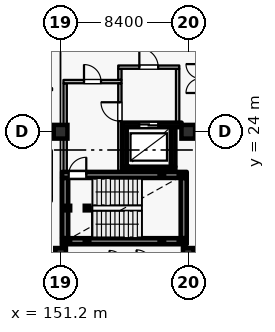
"""IFC4 building model, lengths in metres.
Left out: names, types, materials, properties, quantities, classifications, styles, units other than length and angle.
Written with IfcOpenShell. Run it as: python <this file> out.ifc"""

import sys

from ifc_helpers import new_model, si_unit, direction, frame, frame_2d, origin, origin_2d, place, context, subcontext, project, spatial, rectangle, hollow_rectangle, extrude, element, fill, save


model = new_model("IFC4")
c1 = context("Model", 3, precision=1e-05, world=origin(), true_north=direction((0.0, 1.0)))
c2 = subcontext(c1, "Body", "Model", "MODEL_VIEW")
j1 = project(units=[si_unit("LENGTHUNIT", "METRE"), si_unit("PLANEANGLEUNIT", "RADIAN")], contexts=[c1])
p1 = place(None, origin())
s1 = spatial("IfcSite", under=j1, at=p1, CompositionType="ELEMENT")
p2 = place(p1, origin())
s2 = spatial("IfcBuilding", under=s1, at=p2, CompositionType="ELEMENT")
p3 = place(p2, frame((0.0, 0.0, 21.0)))
s3 = spatial("IfcBuildingStorey", under=s2, at=p3, CompositionType="ELEMENT", Elevation=21.0)
for number, where, z_axis, x_axis in (
    (1, (151.2, 24.0, 0.0), (0.0, 0.0, 1.0), (1.0, 0.0, 0.0)),
    (2, (159.6, 24.0, 0.0), (0.0, 0.0, 1.0), (1.0, 0.0, 0.0)),
):
    element("IfcColumn", number, at=place(p3, frame(where, z_axis=z_axis, x_axis=x_axis)), inside=s3, PredefinedType="COLUMN", context=c2, shape_type="SweptSolid", body=[
        extrude(rectangle(XDim=0.9, YDim=0.9, at=origin_2d()), origin(), (0.0, 0.0, 1.0), 4.2),
    ])
for number, where, z_axis, x_axis in (
    (3, (151.2, 16.0, 0.0), (0.0, 0.0, 1.0), (1.0, 0.0, 0.0)),
    (4, (159.6, 16.0, 0.0), (0.0, 0.0, 1.0), (1.0, 0.0, 0.0)),
):
    element("IfcColumn", number, at=place(p3, frame(where, z_axis=z_axis, x_axis=x_axis)), inside=s3, PredefinedType="COLUMN", context=c2, shape_type="SweptSolid", body=[
        extrude(rectangle(XDim=0.7, YDim=0.7, at=origin_2d()), origin(), (0.0, 0.0, 1.0), 4.2),
    ])
p4 = place(p3, frame((155.25, 21.55, 0.0), z_axis=(0.0, 0.0, 1.0), x_axis=(1.0, 0.0, 0.0)))
e5 = element("IfcWall", 5, at=p4, inside=s3, PredefinedType="SHEAR", context=c2, shape_type="SweptSolid", body=[
    extrude(rectangle(XDim=3.5, YDim=0.3, at=frame_2d((1.75, 0.0))), origin(), (0.0, 0.0, 1.0), 3.965),
])
p5 = place(p3, frame((158.6, 21.705, 0.0), z_axis=(0.0, 0.0, 1.0), x_axis=(0.0, 1.0, 0.0)))
e6 = element("IfcWall", 6, at=p5, inside=s3, PredefinedType="SHEAR", context=c2, shape_type="SweptSolid", body=[
    extrude(rectangle(XDim=2.59, YDim=0.3, at=frame_2d((1.295, 0.0))), origin(), (0.0, 0.0, 1.0), 3.965),
])
p6 = place(p3, frame((159.16, 24.45, 0.0), z_axis=(0.0, 0.0, 1.0), x_axis=(-1.0, 0.0, 0.0)))
e7 = element("IfcWall", 7, at=p6, inside=s3, PredefinedType="SHEAR", context=c2, shape_type="SweptSolid", body=[
    extrude(rectangle(XDim=3.91, YDim=0.3, at=frame_2d((1.955, 0.0))), origin(), (0.0, 0.0, 1.0), 3.965),
])
p7 = place(p6, frame((1.535, 0.0, 0.0)))
e8 = element("IfcOpeningElement", 8, at=p7, cuts=e7, PredefinedType="OPENING", context=c2, shape_type="SweptSolid", body=[
    extrude(rectangle(XDim=1.25, YDim=2.25, at=frame_2d((0.625, 1.125))), frame((0.0, 0.16, 0.0), z_axis=(0.0, -1.0, 0.0), x_axis=(1.0, 0.0, 0.0)), (0.0, 0.0, 1.0), 0.32),
])
p8 = place(p3, frame((155.4, 24.295, 0.0), z_axis=(0.0, 0.0, 1.0), x_axis=(0.0, -1.0, 0.0)))
e9 = element("IfcWall", 9, at=p8, inside=s3, PredefinedType="SHEAR", context=c2, shape_type="SweptSolid", body=[
    extrude(rectangle(XDim=2.59, YDim=0.3, at=frame_2d((1.295, 0.0))), origin(), (0.0, 0.0, 1.0), 3.965),
])
p9 = place(p3, frame((151.3, 16.8, 0.0), z_axis=(0.0, 0.0, 1.0), x_axis=(1.0, 0.0, 0.0)))
e10 = element("IfcWall", 10, at=p9, inside=s3, PredefinedType="SHEAR", context=c2, shape_type="SweptSolid", body=[
    extrude(rectangle(XDim=8.2, YDim=0.4, at=frame_2d((4.1, 0.0))), origin(), (0.0, 0.0, 1.0), 3.965),
])
p10 = place(p3, frame((159.3, 17.005, 0.0), z_axis=(0.0, 0.0, 1.0), x_axis=(0.0, 1.0, 0.0)))
e11 = element("IfcWall", 11, at=p10, inside=s3, PredefinedType="SHEAR", context=c2, shape_type="SweptSolid", body=[
    extrude(rectangle(XDim=3.95, YDim=0.4, at=frame_2d((1.975, 0.0))), origin(), (0.0, 0.0, 1.0), 3.965),
])
p11 = place(p3, frame((151.3, 21.16, 0.0), z_axis=(0.0, 0.0, 1.0), x_axis=(1.0, 0.0, 0.0)))
e12 = element("IfcWall", 12, at=p11, inside=s3, PredefinedType="SHEAR", context=c2, shape_type="SweptSolid", body=[
    extrude(rectangle(XDim=8.2, YDim=0.4, at=frame_2d((4.1, 0.0))), origin(), (0.0, 0.0, 1.0), 3.965),
])
p12 = place(p11, frame((0.43, 0.0, 0.0)))
e13 = element("IfcOpeningElement", 13, at=p12, cuts=e12, PredefinedType="OPENING", context=c2, shape_type="SweptSolid", body=[
    extrude(rectangle(XDim=1.16, YDim=2.2, at=frame_2d((0.58, 1.1))), frame((0.0, 0.21, 0.0), z_axis=(0.0, -1.0, 0.0), x_axis=(1.0, 0.0, 0.0)), (0.0, 0.0, 1.0), 0.42),
])
p13 = place(p3, frame((151.5, 17.005, 0.0), z_axis=(0.0, 0.0, 1.0), x_axis=(0.0, 1.0, 0.0)))
e14 = element("IfcWall", 14, at=p13, inside=s3, PredefinedType="SHEAR", context=c2, shape_type="SweptSolid", body=[
    extrude(rectangle(XDim=3.95, YDim=0.4, at=frame_2d((1.975, 0.0))), origin(), (0.0, 0.0, 1.0), 3.965),
])
p14 = place(p3, frame((151.5, 21.365, 0.0), z_axis=(0.0, 0.0, 1.0), x_axis=(0.0, 1.0, 0.0)))
e15 = element("IfcWall", 15, at=p14, inside=s3, PredefinedType="PARTITIONING", context=c2, shape_type="SweptSolid", body=[
    extrude(rectangle(XDim=5.82, YDim=0.22, at=frame_2d((2.91, 0.0))), origin(), (0.0, 0.0, 1.0), 3.965),
])
p15 = place(p3, frame((151.39, 27.3, 0.0), z_axis=(0.0, 0.0, 1.0), x_axis=(1.0, 0.0, 0.0)))
e16 = element("IfcWall", 16, at=p15, inside=s3, PredefinedType="PARTITIONING", context=c2, shape_type="SweptSolid", body=[
    extrude(rectangle(XDim=3.82, YDim=0.22, at=frame_2d((1.91, 0.0))), origin(), (0.0, 0.0, 1.0), 3.965),
])
p16 = place(p15, frame((1.35, 0.0, 0.0)))
e17 = element("IfcOpeningElement", 17, at=p16, cuts=e16, PredefinedType="OPENING", context=c2, shape_type="SweptSolid", body=[
    extrude(rectangle(XDim=1.12, YDim=2.2, at=frame_2d((0.56, 1.1))), frame((0.0, 0.12, 0.0), z_axis=(0.0, -1.0, 0.0), x_axis=(1.0, 0.0, 0.0)), (0.0, 0.0, 1.0), 0.24),
])
p17 = place(p3, frame((155.1, 21.365, 0.0), z_axis=(0.0, 0.0, 1.0), x_axis=(0.0, 1.0, 0.0)))
e18 = element("IfcWall", 18, at=p17, inside=s3, PredefinedType="PARTITIONING", context=c2, shape_type="SweptSolid", body=[
    extrude(rectangle(XDim=5.82, YDim=0.22, at=frame_2d((2.91, 0.0))), origin(), (0.0, 0.0, 1.0), 3.965),
])
p18 = place(p17, frame((3.335, 0.0, 0.0)))
e19 = element("IfcOpeningElement", 19, at=p18, cuts=e18, PredefinedType="OPENING", context=c2, shape_type="SweptSolid", body=[
    extrude(rectangle(XDim=1.24, YDim=2.2, at=frame_2d((0.62, 1.1))), frame((0.0, 0.12, 0.0), z_axis=(0.0, -1.0, 0.0), x_axis=(1.0, 0.0, 0.0)), (0.0, 0.0, 1.0), 0.24),
])
p19 = place(p3, frame((155.1, 27.415, 0.0), z_axis=(0.0, 0.0, 1.0), x_axis=(0.0, 1.0, 0.0)))
e20 = element("IfcWall", 20, at=p19, inside=s3, PredefinedType="PARTITIONING", context=c2, shape_type="SweptSolid", body=[
    extrude(rectangle(XDim=0.72, YDim=0.22, at=frame_2d((0.36, 0.0))), origin(), (0.0, 0.0, 1.0), 3.965),
])
p20 = place(p3, frame((158.9, 24.605, 0.0), z_axis=(0.0, 0.0, 1.0), x_axis=(0.0, 1.0, 0.0)))
e21 = element("IfcWall", 21, at=p20, inside=s3, PredefinedType="PARTITIONING", context=c2, shape_type="SweptSolid", body=[
    extrude(rectangle(XDim=3.53, YDim=0.22, at=frame_2d((1.765, 0.0))), origin(), (0.0, 0.0, 1.0), 3.965),
])
p21 = place(p3, frame((154.99, 28.25, 0.0), z_axis=(0.0, 0.0, 1.0), x_axis=(1.0, 0.0, 0.0)))
e22 = element("IfcWall", 22, at=p21, inside=s3, PredefinedType="PARTITIONING", context=c2, shape_type="SweptSolid", body=[
    extrude(rectangle(XDim=4.02, YDim=0.22, at=frame_2d((2.01, 0.0))), origin(), (0.0, 0.0, 1.0), 3.965),
])
p22 = place(p21, frame((1.39, 0.0, 0.0)))
e23 = element("IfcOpeningElement", 23, at=p22, cuts=e22, PredefinedType="OPENING", context=c2, shape_type="SweptSolid", body=[
    extrude(rectangle(XDim=1.24, YDim=2.2, at=frame_2d((0.62, 1.1))), frame((0.0, 0.12, 0.0), z_axis=(0.0, -1.0, 0.0), x_axis=(1.0, 0.0, 0.0)), (0.0, 0.0, 1.0), 0.24),
])
for number, where, z_axis, x_axis in (
    (24, (151.68, 16.8, 0.0), (0.0, 0.0, 1.0), (1.0, 0.0, 0.0)),
    (25, (151.68, 18.98, 0.0), (0.0, 0.0, 1.0), (1.0, 0.0, 0.0)),
    (26, (152.94, 16.8, 0.0), (0.0, 0.0, 1.0), (1.0, 0.0, 0.0)),
    (27, (152.94, 18.98, 0.0), (0.0, 0.0, 1.0), (1.0, 0.0, 0.0)),
):
    element("IfcColumn", number, at=place(p3, frame(where, z_axis=z_axis, x_axis=x_axis)), inside=s3, PredefinedType="COLUMN", context=c2, shape_type="SweptSolid", body=[
        extrude(hollow_rectangle(XDim=0.3, YDim=0.3, WallThickness=0.012, at=origin_2d()), origin(), (0.0, 0.0, 1.0), 4.02),
    ])
for number, where, z_axis, x_axis in (
    (28, (157.86, 16.8, -2.4), (0.0, 0.0, 1.0), (1.0, 0.0, 0.0)),
    (29, (157.86, 21.16, -2.4), (0.0, 0.0, 1.0), (1.0, 0.0, 0.0)),
    (30, (159.12, 16.8, -2.4), (0.0, 0.0, 1.0), (1.0, 0.0, 0.0)),
    (31, (159.12, 21.16, -2.4), (0.0, 0.0, 1.0), (1.0, 0.0, 0.0)),
):
    element("IfcColumn", number, at=place(p3, frame(where, z_axis=z_axis, x_axis=x_axis)), inside=s3, PredefinedType="COLUMN", context=c2, shape_type="SweptSolid", body=[
        extrude(hollow_rectangle(XDim=0.3, YDim=0.3, WallThickness=0.012, at=origin_2d()), origin(), (0.0, 0.0, 1.0), 4.32),
    ])
p23 = place(p7, origin())
e32 = element("IfcDoor", 32, at=p23, inside=s3, OperationType="DOUBLE_DOOR_SLIDING", PredefinedType="DOOR", context=c2, shape_type="SweptSolid", body=[
    extrude(rectangle(XDim=1.25, YDim=2.25, at=frame_2d((0.625, 1.125))), frame((0.0, 0.025, 0.0), z_axis=(0.0, -1.0, 0.0), x_axis=(1.0, 0.0, 0.0)), (0.0, 0.0, 1.0), 0.05),
])
fill(e8, e32)
p24 = place(p12, origin())
e33 = element("IfcDoor", 33, at=p24, inside=s3, OperationType="SINGLE_SWING_RIGHT", PredefinedType="DOOR", context=c2, shape_type="SweptSolid", body=[
    extrude(rectangle(XDim=1.16, YDim=2.2, at=frame_2d((0.58, 1.1))), frame((0.0, 0.025, 0.0), z_axis=(0.0, -1.0, 0.0), x_axis=(1.0, 0.0, 0.0)), (0.0, 0.0, 1.0), 0.05),
])
fill(e13, e33)
p25 = place(p16, origin())
e34 = element("IfcDoor", 34, at=p25, inside=s3, OperationType="SINGLE_SWING_LEFT", PredefinedType="DOOR", context=c2, shape_type="SweptSolid", body=[
    extrude(rectangle(XDim=1.12, YDim=2.2, at=frame_2d((0.56, 1.1))), frame((0.0, 0.025, 0.0), z_axis=(0.0, -1.0, 0.0), x_axis=(1.0, 0.0, 0.0)), (0.0, 0.0, 1.0), 0.05),
])
fill(e17, e34)
p26 = place(p18, origin())
e35 = element("IfcDoor", 35, at=p26, inside=s3, OperationType="SINGLE_SWING_RIGHT", PredefinedType="DOOR", context=c2, shape_type="SweptSolid", body=[
    extrude(rectangle(XDim=1.24, YDim=2.2, at=frame_2d((0.62, 1.1))), frame((0.0, 0.025, 0.0), z_axis=(0.0, -1.0, 0.0), x_axis=(1.0, 0.0, 0.0)), (0.0, 0.0, 1.0), 0.05),
])
fill(e19, e35)
p27 = place(p22, origin())
e36 = element("IfcDoor", 36, at=p27, inside=s3, OperationType="SINGLE_SWING_LEFT", PredefinedType="DOOR", context=c2, shape_type="SweptSolid", body=[
    extrude(rectangle(XDim=1.24, YDim=2.2, at=frame_2d((0.62, 1.1))), frame((0.0, 0.025, 0.0), z_axis=(0.0, -1.0, 0.0), x_axis=(1.0, 0.0, 0.0)), (0.0, 0.0, 1.0), 0.05),
])
fill(e23, e36)
save(model, sys.argv[1])
